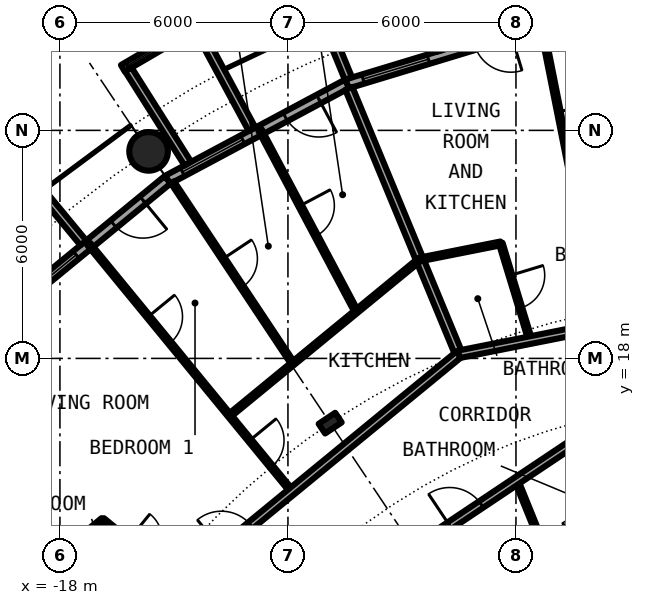
"""IFC4 building model, lengths in metres.
Left out: names, types, materials, properties, quantities, classifications, styles, units other than length and angle.
Written with IfcOpenShell. Run it as: python <this file> out.ifc"""

import sys

from ifc_helpers import new_model, si_unit, direction, frame, frame_2d, origin, origin_2d, place, context, subcontext, project, spatial, rectangle, circle, hollow_circle, i_section, extrude, element, fill, save


model = new_model("IFC4")
c1 = context("Model", 3, precision=1e-05, world=origin(), true_north=direction((0.0, 1.0)))
c2 = subcontext(c1, "Body", "Model", "MODEL_VIEW")
j1 = project(units=[si_unit("LENGTHUNIT", "METRE"), si_unit("PLANEANGLEUNIT", "RADIAN")], contexts=[c1])
p1 = place(None, origin())
s1 = spatial("IfcSite", under=j1, at=p1, CompositionType="ELEMENT")
p2 = place(p1, origin())
s2 = spatial("IfcBuilding", under=s1, at=p2, CompositionType="ELEMENT")
p3 = place(p2, frame((0.0, 0.0, 88.0)))
s3 = spatial("IfcBuildingStorey", under=s2, at=p3, CompositionType="ELEMENT", Elevation=88.0)
p4 = place(p3, frame((-15.667, 23.448, 0.0), z_axis=(0.0, 0.0, 1.0), x_axis=(1.0, 0.0, 0.0)))
e1 = element("IfcColumn", 1, at=p4, inside=s3, PredefinedType="COLUMN", context=c2, shape_type="SweptSolid", body=[
    extrude(hollow_circle(Radius=0.508, WallThickness=0.04, at=origin_2d()), origin(), (0.0, 0.0, 1.0), 3.05),
])
p5 = place(p3, frame((-10.889, 16.297, 0.0), z_axis=(0.0, 0.0, 1.0), x_axis=(-0.55557023302, 0.831469612303, 0.0)))
e2 = element("IfcColumn", 2, at=p5, inside=s3, PredefinedType="COLUMN", context=c2, shape_type="SweptSolid", body=[
    extrude(i_section(OverallWidth=0.306, OverallDepth=0.524, WebThickness=0.021, FlangeThickness=0.04, FilletRadius=0.027, at=origin_2d()), origin(), (0.0, 0.0, 1.0), 3.05),
])
p6 = place(p3, frame((-5.326, 26.775, 0.0), z_axis=(0.0, 0.0, 1.0), x_axis=(-0.956965678721, -0.290201119486, 0.0)))
e3 = element("IfcWall", 3, at=p6, inside=s3, PredefinedType="SOLIDWALL", context=c2, shape_type="SweptSolid", body=[
    extrude(rectangle(XDim=5.351, YDim=0.25, at=frame_2d((2.676, 0.0))), origin(), (0.0, 0.0, 1.0), 2.7),
])
p7 = place(p6, frame((0.841, 0.0, 0.0)))
e4 = element("IfcOpeningElement", 4, at=p7, cuts=e3, PredefinedType="OPENING", context=c2, shape_type="SweptSolid", body=[
    extrude(rectangle(XDim=1.0, YDim=2.2, at=frame_2d((0.5, 1.1))), frame((0.0, 0.135, 0.0), z_axis=(0.0, -1.0, 0.0), x_axis=(1.0, 0.0, 0.0)), (0.0, 0.0, 1.0), 0.27),
])
p8 = place(p6, frame((3.111, 0.0, 0.3)))
e5 = element("IfcOpeningElement", 5, at=p8, cuts=e3, PredefinedType="OPENING", context=c2, shape_type="SweptSolid", body=[
    extrude(rectangle(XDim=1.8, YDim=2.1, at=frame_2d((0.9, 1.05))), frame((0.0, 0.135, 0.0), z_axis=(0.0, -1.0, 0.0), x_axis=(1.0, 0.0, 0.0)), (0.0, 0.0, 1.0), 0.27),
])
p9 = place(p3, frame((-8.009, 26.092, -0.03), z_axis=(0.0, 0.0, 1.0), x_axis=(-0.293406695073, 0.955987715029, 0.0)))
e6 = element("IfcWall", 6, at=p9, inside=s3, PredefinedType="SOLIDWALL", context=c2, shape_type="SweptSolid", body=[
    extrude(rectangle(XDim=3.006, YDim=0.2, at=frame_2d((1.503, 0.0))), origin(), (0.0, 0.0, 1.0), 2.73),
])
p10 = place(p3, frame((-10.409, 25.364, -0.03), z_axis=(0.0, 0.0, 1.0), x_axis=(-0.379509886562, 0.925187681501, 0.0)))
e7 = element("IfcWall", 7, at=p10, inside=s3, PredefinedType="SOLIDWALL", context=c2, shape_type="SweptSolid", body=[
    extrude(rectangle(XDim=2.883, YDim=0.2, at=frame_2d((1.441, 0.0))), origin(), (0.0, 0.0, 1.0), 2.73),
])
p11 = place(p3, frame((-10.447, 25.222, 0.0), z_axis=(0.0, 0.0, 1.0), x_axis=(-0.881915646801, -0.471407246368, 0.0)))
e8 = element("IfcWall", 8, at=p11, inside=s3, PredefinedType="SOLIDWALL", context=c2, shape_type="SweptSolid", body=[
    extrude(rectangle(XDim=5.352, YDim=0.25, at=frame_2d((2.676, 0.0))), origin(), (0.0, 0.0, 1.0), 2.7),
])
p12 = place(p11, frame((0.841, 0.0, 0.0)))
e9 = element("IfcOpeningElement", 9, at=p12, cuts=e8, PredefinedType="OPENING", context=c2, shape_type="SweptSolid", body=[
    extrude(rectangle(XDim=1.0, YDim=2.2, at=frame_2d((0.5, 1.1))), frame((0.0, 0.135, 0.0), z_axis=(0.0, -1.0, 0.0), x_axis=(1.0, 0.0, 0.0)), (0.0, 0.0, 1.0), 0.27),
])
p13 = place(p11, frame((3.111, 0.0, 0.3)))
e10 = element("IfcOpeningElement", 10, at=p13, cuts=e8, PredefinedType="OPENING", context=c2, shape_type="SweptSolid", body=[
    extrude(rectangle(XDim=1.8, YDim=2.1, at=frame_2d((0.9, 1.05))), frame((0.0, 0.135, 0.0), z_axis=(0.0, -1.0, 0.0), x_axis=(1.0, 0.0, 0.0)), (0.0, 0.0, 1.0), 0.27),
])
p14 = place(p3, frame((-14.327, 26.812, -0.03), z_axis=(0.0, 0.0, 1.0), x_axis=(-0.863346521872, -0.504611517081, 0.0)))
e11 = element("IfcWall", 11, at=p14, inside=s3, PredefinedType="SOLIDWALL", context=c2, shape_type="SweptSolid", body=[
    extrude(rectangle(XDim=2.336, YDim=0.2, at=frame_2d((1.168, 0.0))), origin(), (0.0, 0.0, 1.0), 2.73),
])
p15 = place(p14, frame((0.128, 0.0, 0.33)))
e12 = element("IfcOpeningElement", 12, at=p15, cuts=e11, PredefinedType="OPENING", context=c2, shape_type="SweptSolid", body=[
    extrude(circle(Radius=1.04, at=frame_2d((1.04, 1.04))), frame((0.0, 0.11, 0.0), z_axis=(0.0, -1.0, 0.0), x_axis=(1.0, 0.0, 0.0)), (0.0, 0.0, 1.0), 0.22),
])
p16 = place(p3, frame((-12.945, 24.029, -0.03), z_axis=(0.0, 0.0, 1.0), x_axis=(-0.474424310775, 0.88029629861, 0.0)))
e13 = element("IfcWall", 13, at=p16, inside=s3, PredefinedType="SOLIDWALL", context=c2, shape_type="SweptSolid", body=[
    extrude(rectangle(XDim=3.006, YDim=0.2, at=frame_2d((1.503, 0.0))), origin(), (0.0, 0.0, 1.0), 2.73),
])
p17 = place(p3, frame((-14.635, 23.126, -0.03), z_axis=(0.0, 0.0, 1.0), x_axis=(-0.534437802731, 0.845207805816, 0.0)))
e14 = element("IfcWall", 14, at=p17, inside=s3, PredefinedType="SOLIDWALL", context=c2, shape_type="SweptSolid", body=[
    extrude(rectangle(XDim=2.932, YDim=0.2, at=frame_2d((1.466, 0.0))), origin(), (0.0, 0.0, 1.0), 2.73),
])
p18 = place(p3, frame((-15.167, 22.699, 0.0), z_axis=(0.0, 0.0, 1.0), x_axis=(-0.773019449054, -0.634382322723, 0.0)))
e15 = element("IfcWall", 15, at=p18, inside=s3, PredefinedType="SOLIDWALL", context=c2, shape_type="SweptSolid", body=[
    extrude(rectangle(XDim=5.352, YDim=0.25, at=frame_2d((2.676, 0.0))), origin(), (0.0, 0.0, 1.0), 2.7),
])
p19 = place(p18, frame((0.841, 0.0, 0.0)))
e16 = element("IfcOpeningElement", 16, at=p19, cuts=e15, PredefinedType="OPENING", context=c2, shape_type="SweptSolid", body=[
    extrude(rectangle(XDim=1.0, YDim=2.2, at=frame_2d((0.5, 1.1))), frame((0.0, 0.135, 0.0), z_axis=(0.0, -1.0, 0.0), x_axis=(1.0, 0.0, 0.0)), (0.0, 0.0, 1.0), 0.27),
])
p20 = place(p18, frame((3.111, 0.0, 0.3)))
e17 = element("IfcOpeningElement", 17, at=p20, cuts=e15, PredefinedType="OPENING", context=c2, shape_type="SweptSolid", body=[
    extrude(rectangle(XDim=1.8, YDim=2.1, at=frame_2d((0.9, 1.05))), frame((0.0, 0.135, 0.0), z_axis=(0.0, -1.0, 0.0), x_axis=(1.0, 0.0, 0.0)), (0.0, 0.0, 1.0), 0.27),
])
p21 = place(p3, frame((-17.384, 21.041, -0.03), z_axis=(0.0, 0.0, 1.0), x_axis=(-0.63709551667, 0.770784861449, 0.0)))
e18 = element("IfcWall", 18, at=p21, inside=s3, PredefinedType="SOLIDWALL", context=c2, shape_type="SweptSolid", body=[
    extrude(rectangle(XDim=3.006, YDim=0.2, at=frame_2d((1.503, 0.0))), origin(), (0.0, 0.0, 1.0), 2.73),
])
p22 = place(p3, frame((-22.595, 15.098, 0.0), z_axis=(0.0, 0.0, 1.0), x_axis=(0.831382022135, -0.555701298605, 0.0)))
e19 = element("IfcWall", 19, at=p22, inside=s3, PredefinedType="PARTITIONING", context=c2, shape_type="SweptSolid", body=[
    extrude(rectangle(XDim=7.313, YDim=0.2, at=frame_2d((3.657, 0.0))), origin(), (0.0, 0.0, 1.0), 2.7),
])
p23 = place(p3, frame((-17.24, 21.007, 0.0), z_axis=(0.0, 0.0, 1.0), x_axis=(0.634396151441, -0.77300810024, 0.0)))
e20 = element("IfcWall", 20, at=p23, inside=s3, PredefinedType="PARTITIONING", context=c2, shape_type="SweptSolid", body=[
    extrude(rectangle(XDim=8.419, YDim=0.1, at=frame_2d((4.209, 0.0))), origin(), (0.0, 0.0, 1.0), 2.7),
])
p24 = place(p23, frame((6.679, 0.0, 0.0)))
e21 = element("IfcOpeningElement", 21, at=p24, cuts=e20, PredefinedType="OPENING", context=c2, shape_type="SweptSolid", body=[
    extrude(rectangle(XDim=0.9, YDim=2.3, at=frame_2d((0.45, 1.15))), frame((0.0, 0.06, 0.0), z_axis=(0.0, -1.0, 0.0), x_axis=(1.0, 0.0, 0.0)), (0.0, 0.0, 1.0), 0.12),
])
p25 = place(p23, frame((2.468, 0.0, 0.0)))
e22 = element("IfcOpeningElement", 22, at=p25, cuts=e20, PredefinedType="OPENING", context=c2, shape_type="SweptSolid", body=[
    extrude(rectangle(XDim=0.9, YDim=2.3, at=frame_2d((0.45, 1.15))), frame((0.0, 0.06, 0.0), z_axis=(0.0, -1.0, 0.0), x_axis=(1.0, 0.0, 0.0)), (0.0, 0.0, 1.0), 0.12),
])
p26 = place(p3, frame((-16.874, 13.758, 0.0), z_axis=(0.0, 0.0, 1.0), x_axis=(0.774979608522, -0.631986239072, 0.0)))
e23 = element("IfcWall", 23, at=p26, inside=s3, PredefinedType="PARTITIONING", context=c2, shape_type="SweptSolid", body=[
    extrude(rectangle(XDim=2.636, YDim=0.1, at=frame_2d((1.318, 0.0))), origin(), (0.0, 0.0, 1.0), 2.7),
])
p27 = place(p26, frame((0.868, 0.0, 0.0)))
e24 = element("IfcOpeningElement", 24, at=p27, cuts=e23, PredefinedType="OPENING", context=c2, shape_type="SweptSolid", body=[
    extrude(rectangle(XDim=0.9, YDim=2.3, at=frame_2d((0.45, 1.15))), frame((0.0, 0.06, 0.0), z_axis=(0.0, -1.0, 0.0), x_axis=(1.0, 0.0, 0.0)), (0.0, 0.0, 1.0), 0.12),
])
p28 = place(p3, frame((-15.039, 22.634, 0.0), z_axis=(0.0, 0.0, 1.0), x_axis=(0.553440102418, -0.832888980018, 0.0)))
e25 = element("IfcWall", 25, at=p28, inside=s3, PredefinedType="PARTITIONING", context=c2, shape_type="SweptSolid", body=[
    extrude(rectangle(XDim=5.726, YDim=0.1, at=frame_2d((2.863, 0.0))), origin(), (0.0, 0.0, 1.0), 2.7),
])
p29 = place(p28, frame((2.413, 0.0, 0.0)))
e26 = element("IfcOpeningElement", 26, at=p29, cuts=e25, PredefinedType="OPENING", context=c2, shape_type="SweptSolid", body=[
    extrude(rectangle(XDim=0.9, YDim=2.3, at=frame_2d((0.45, 1.15))), frame((0.0, 0.06, 0.0), z_axis=(0.0, -1.0, 0.0), x_axis=(1.0, 0.0, 0.0)), (0.0, 0.0, 1.0), 0.12),
])
p30 = place(p3, frame((-12.734, 24.007, 0.0), z_axis=(0.0, 0.0, 1.0), x_axis=(0.468610030042, -0.883405139075, 0.0)))
e27 = element("IfcWall", 27, at=p30, inside=s3, PredefinedType="PARTITIONING", context=c2, shape_type="SweptSolid", body=[
    extrude(rectangle(XDim=5.403, YDim=0.1, at=frame_2d((2.702, 0.0))), origin(), (0.0, 0.0, 1.0), 2.7),
])
p31 = place(p30, frame((2.252, 0.0, 0.0)))
e28 = element("IfcOpeningElement", 28, at=p31, cuts=e27, PredefinedType="OPENING", context=c2, shape_type="SweptSolid", body=[
    extrude(rectangle(XDim=0.9, YDim=2.3, at=frame_2d((0.45, 1.15))), frame((0.0, 0.06, 0.0), z_axis=(0.0, -1.0, 0.0), x_axis=(1.0, 0.0, 0.0)), (0.0, 0.0, 1.0), 0.12),
])
p32 = place(p3, frame((-10.398, 25.106, 0.0), z_axis=(0.0, 0.0, 1.0), x_axis=(0.382490346157, -0.923959487801, 0.0)))
e29 = element("IfcWall", 29, at=p32, inside=s3, PredefinedType="PARTITIONING", context=c2, shape_type="SweptSolid", body=[
    extrude(rectangle(XDim=7.574, YDim=0.2, at=frame_2d((3.787, 0.0))), origin(), (0.0, 0.0, 1.0), 2.7),
])
p33 = place(p3, frame((-6.4, 21.027, 0.0), z_axis=(0.0, 0.0, 1.0), x_axis=(0.291157965538, -0.956674991365, 0.0)))
e30 = element("IfcWall", 30, at=p33, inside=s3, PredefinedType="PARTITIONING", context=c2, shape_type="SweptSolid", body=[
    extrude(rectangle(XDim=2.661, YDim=0.1, at=frame_2d((1.331, 0.0))), origin(), (0.0, 0.0, 1.0), 2.7),
])
p34 = place(p33, frame((0.881, 0.0, 0.0)))
e31 = element("IfcOpeningElement", 31, at=p34, cuts=e30, PredefinedType="OPENING", context=c2, shape_type="SweptSolid", body=[
    extrude(rectangle(XDim=0.9, YDim=2.3, at=frame_2d((0.45, 1.15))), frame((0.0, 0.06, 0.0), z_axis=(0.0, -1.0, 0.0), x_axis=(1.0, 0.0, 0.0)), (0.0, 0.0, 1.0), 0.12),
])
p35 = place(p3, frame((-5.986, 14.779, 0.0), z_axis=(0.0, 0.0, 1.0), x_axis=(0.375649498413, -0.926761811008, 0.0)))
e32 = element("IfcWall", 32, at=p35, inside=s3, PredefinedType="PARTITIONING", context=c2, shape_type="SweptSolid", body=[
    extrude(rectangle(XDim=2.548, YDim=0.1, at=frame_2d((1.274, 0.0))), origin(), (0.0, 0.0, 1.0), 2.7),
])
p36 = place(p3, frame((-5.302, 26.653, 0.0), z_axis=(0.0, 0.0, 1.0), x_axis=(0.195115793364, -0.980780213493, 0.0)))
e33 = element("IfcWall", 33, at=p36, inside=s3, PredefinedType="PARTITIONING", context=c2, shape_type="SweptSolid", body=[
    extrude(rectangle(XDim=5.304, YDim=0.1, at=frame_2d((2.652, 0.0))), origin(), (0.0, 0.0, 1.0), 2.7),
])
p37 = place(p36, frame((2.202, 0.0, 0.0)))
e34 = element("IfcOpeningElement", 34, at=p37, cuts=e33, PredefinedType="OPENING", context=c2, shape_type="SweptSolid", body=[
    extrude(rectangle(XDim=0.9, YDim=2.3, at=frame_2d((0.45, 1.15))), frame((0.0, 0.06, 0.0), z_axis=(0.0, -1.0, 0.0), x_axis=(1.0, 0.0, 0.0)), (0.0, 0.0, 1.0), 0.12),
])
p38 = place(p3, frame((-5.032, 12.417, 0.0), z_axis=(0.0, 0.0, 1.0), x_axis=(0.831538390496, 0.555467285384, 0.0)))
e35 = element("IfcWall", 35, at=p38, inside=s3, PredefinedType="PARTITIONING", context=c2, shape_type="SweptSolid", body=[
    extrude(rectangle(XDim=2.717, YDim=0.1, at=frame_2d((1.358, 0.0))), origin(), (0.0, 0.0, 1.0), 2.7),
])
p39 = place(p38, frame((0.911, 0.0, 0.0)))
e36 = element("IfcOpeningElement", 36, at=p39, cuts=e35, PredefinedType="OPENING", context=c2, shape_type="SweptSolid", body=[
    extrude(rectangle(XDim=0.9, YDim=2.3, at=frame_2d((0.45, 1.15))), frame((0.0, 0.06, 0.0), z_axis=(0.0, -1.0, 0.0), x_axis=(1.0, 0.0, 0.0)), (0.0, 0.0, 1.0), 0.12),
])
p40 = place(p3, frame((-12.708, 10.286, 0.0), z_axis=(0.0, 0.0, 1.0), x_axis=(0.831405725802, 0.555665834026, 0.0)))
e37 = element("IfcWall", 37, at=p40, inside=s3, PredefinedType="PARTITIONING", context=c2, shape_type="SweptSolid", body=[
    extrude(rectangle(XDim=11.314, YDim=0.2, at=frame_2d((5.657, 0.0))), origin(), (0.0, 0.0, 1.0), 2.7),
])
p41 = place(p40, frame((5.969, 0.0, 0.0)))
e38 = element("IfcOpeningElement", 38, at=p41, cuts=e37, PredefinedType="OPENING", context=c2, shape_type="SweptSolid", body=[
    extrude(rectangle(XDim=1.0, YDim=2.3, at=frame_2d((0.5, 1.15))), frame((0.0, 0.11, 0.0), z_axis=(0.0, -1.0, 0.0), x_axis=(1.0, 0.0, 0.0)), (0.0, 0.0, 1.0), 0.22),
])
p42 = place(p3, frame((-16.173, 10.991, 0.0), z_axis=(0.0, 0.0, 1.0), x_axis=(0.773049018445, 0.634346289562, 0.0)))
e39 = element("IfcWall", 39, at=p42, inside=s3, PredefinedType="PARTITIONING", context=c2, shape_type="SweptSolid", body=[
    extrude(rectangle(XDim=11.219, YDim=0.2, at=frame_2d((5.61, 0.0))), origin(), (0.0, 0.0, 1.0), 2.38),
])
p43 = place(p42, frame((3.135, 0.0, 0.0)))
e40 = element("IfcOpeningElement", 40, at=p43, cuts=e39, PredefinedType="OPENING", context=c2, shape_type="SweptSolid", body=[
    extrude(rectangle(XDim=1.0, YDim=2.3, at=frame_2d((0.5, 1.15))), frame((0.0, 0.11, 0.0), z_axis=(0.0, -1.0, 0.0), x_axis=(1.0, 0.0, 0.0)), (0.0, 0.0, 1.0), 0.22),
])
p44 = place(p3, frame((-7.501, 18.108, 0.0), z_axis=(0.0, 0.0, 1.0), x_axis=(0.980791233058, 0.195060393611, 0.0)))
e41 = element("IfcWall", 41, at=p44, inside=s3, PredefinedType="PARTITIONING", context=c2, shape_type="SweptSolid", body=[
    extrude(rectangle(XDim=7.65, YDim=0.2, at=frame_2d((3.825, 0.0))), origin(), (0.0, 0.0, 1.0), 2.38),
])
p45 = place(p44, frame((4.313, 0.0, 0.0)))
e42 = element("IfcOpeningElement", 42, at=p45, cuts=e41, PredefinedType="OPENING", context=c2, shape_type="SweptSolid", body=[
    extrude(rectangle(XDim=1.0, YDim=2.3, at=frame_2d((0.5, 1.15))), frame((0.0, 0.11, 0.0), z_axis=(0.0, -1.0, 0.0), x_axis=(1.0, 0.0, 0.0)), (0.0, 0.0, 1.0), 0.22),
])
p46 = place(p3, frame((-18.542, 12.389, 0.0), z_axis=(0.0, 0.0, 1.0), x_axis=(0.772948171844, 0.634469166818, 0.0)))
e43 = element("IfcWall", 43, at=p46, inside=s3, PredefinedType="PARTITIONING", context=c2, shape_type="SweptSolid", body=[
    extrude(rectangle(XDim=2.158, YDim=0.1, at=frame_2d((1.079, 0.0))), origin(), (0.0, 0.0, 1.0), 2.7),
])
p47 = place(p3, frame((-13.538, 16.496, 0.0), z_axis=(0.0, 0.0, 1.0), x_axis=(0.773000340237, 0.634405606843, 0.0)))
e44 = element("IfcWall", 44, at=p47, inside=s3, PredefinedType="PARTITIONING", context=c2, shape_type="SweptSolid", body=[
    extrude(rectangle(XDim=6.474, YDim=0.1, at=frame_2d((3.237, 0.0))), origin(), (0.0, 0.0, 1.0), 2.7),
])
p48 = place(p3, frame((-8.534, 20.603, 0.0), z_axis=(0.0, 0.0, 1.0), x_axis=(0.980821612706, 0.194907578226, 0.0)))
e45 = element("IfcWall", 45, at=p48, inside=s3, PredefinedType="PARTITIONING", context=c2, shape_type="SweptSolid", body=[
    extrude(rectangle(XDim=2.176, YDim=0.1, at=frame_2d((1.088, 0.0))), origin(), (0.0, 0.0, 1.0), 2.7),
])
p49 = place(p8, origin())
e46 = element("IfcWindow", 46, at=p49, inside=s3, PartitioningType="SINGLE_PANEL", PredefinedType="WINDOW", context=c2, shape_type="SweptSolid", body=[
    extrude(rectangle(XDim=1.8, YDim=2.1, at=frame_2d((0.9, 1.05))), frame((0.0, 0.03, 0.0), z_axis=(0.0, -1.0, 0.0), x_axis=(1.0, 0.0, 0.0)), (0.0, 0.0, 1.0), 0.06),
])
fill(e5, e46)
p50 = place(p12, origin())
e47 = element("IfcDoor", 47, at=p50, inside=s3, OperationType="SINGLE_SWING_LEFT", PredefinedType="DOOR", context=c2, shape_type="SweptSolid", body=[
    extrude(rectangle(XDim=1.0, YDim=2.2, at=frame_2d((0.5, 1.1))), frame((0.0, 0.025, 0.0), z_axis=(0.0, -1.0, 0.0), x_axis=(1.0, 0.0, 0.0)), (0.0, 0.0, 1.0), 0.05),
])
fill(e9, e47)
p51 = place(p13, origin())
e48 = element("IfcWindow", 48, at=p51, inside=s3, PartitioningType="SINGLE_PANEL", PredefinedType="WINDOW", context=c2, shape_type="SweptSolid", body=[
    extrude(rectangle(XDim=1.8, YDim=2.1, at=frame_2d((0.9, 1.05))), frame((0.0, 0.03, 0.0), z_axis=(0.0, -1.0, 0.0), x_axis=(1.0, 0.0, 0.0)), (0.0, 0.0, 1.0), 0.06),
])
fill(e10, e48)
p52 = place(p15, origin())
e49 = element("IfcWindow", 49, at=p52, inside=s3, PartitioningType="SINGLE_PANEL", PredefinedType="WINDOW", context=c2, shape_type="SweptSolid", body=[
    extrude(circle(Radius=1.04, at=frame_2d((1.04, 1.04))), frame((0.0, 0.03, 0.0), z_axis=(0.0, -1.0, 0.0), x_axis=(1.0, 0.0, 0.0)), (0.0, 0.0, 1.0), 0.06),
])
fill(e12, e49)
p53 = place(p19, origin())
e50 = element("IfcDoor", 50, at=p53, inside=s3, OperationType="SINGLE_SWING_LEFT", PredefinedType="DOOR", context=c2, shape_type="SweptSolid", body=[
    extrude(rectangle(XDim=1.0, YDim=2.2, at=frame_2d((0.5, 1.1))), frame((0.0, 0.025, 0.0), z_axis=(0.0, -1.0, 0.0), x_axis=(1.0, 0.0, 0.0)), (0.0, 0.0, 1.0), 0.05),
])
fill(e16, e50)
p54 = place(p20, origin())
e51 = element("IfcWindow", 51, at=p54, inside=s3, PartitioningType="SINGLE_PANEL", PredefinedType="WINDOW", context=c2, shape_type="SweptSolid", body=[
    extrude(rectangle(XDim=1.8, YDim=2.1, at=frame_2d((0.9, 1.05))), frame((0.0, 0.03, 0.0), z_axis=(0.0, -1.0, 0.0), x_axis=(1.0, 0.0, 0.0)), (0.0, 0.0, 1.0), 0.06),
])
fill(e17, e51)
p55 = place(p34, origin())
e52 = element("IfcDoor", 52, at=p55, inside=s3, OperationType="SINGLE_SWING_RIGHT", PredefinedType="DOOR", context=c2, shape_type="SweptSolid", body=[
    extrude(rectangle(XDim=0.9, YDim=2.3, at=frame_2d((0.45, 1.15))), frame((0.0, 0.025, 0.0), z_axis=(0.0, -1.0, 0.0), x_axis=(1.0, 0.0, 0.0)), (0.0, 0.0, 1.0), 0.05),
])
fill(e31, e52)
p56 = place(p37, origin())
e53 = element("IfcDoor", 53, at=p56, inside=s3, OperationType="SINGLE_SWING_LEFT", PredefinedType="DOOR", context=c2, shape_type="SweptSolid", body=[
    extrude(rectangle(XDim=0.9, YDim=2.3, at=frame_2d((0.45, 1.15))), frame((0.0, 0.025, 0.0), z_axis=(0.0, -1.0, 0.0), x_axis=(1.0, 0.0, 0.0)), (0.0, 0.0, 1.0), 0.05),
])
fill(e34, e53)
p57 = place(p43, origin())
e54 = element("IfcDoor", 54, at=p57, inside=s3, OperationType="SINGLE_SWING_LEFT", PredefinedType="DOOR", context=c2, shape_type="SweptSolid", body=[
    extrude(rectangle(XDim=1.0, YDim=2.3, at=frame_2d((0.5, 1.15))), frame((0.0, 0.025, 0.0), z_axis=(0.0, -1.0, 0.0), x_axis=(1.0, 0.0, 0.0)), (0.0, 0.0, 1.0), 0.05),
])
fill(e40, e54)
p58 = place(p24, origin())
e55 = element("IfcDoor", 55, at=p58, inside=s3, OperationType="SINGLE_SWING_RIGHT", PredefinedType="DOOR", context=c2, shape_type="SweptSolid", body=[
    extrude(rectangle(XDim=0.9, YDim=2.3, at=frame_2d((0.45, 1.15))), frame((0.0, 0.025, 0.0), z_axis=(0.0, -1.0, 0.0), x_axis=(1.0, 0.0, 0.0)), (0.0, 0.0, 1.0), 0.05),
])
fill(e21, e55)
p59 = place(p25, origin())
e56 = element("IfcDoor", 56, at=p59, inside=s3, OperationType="SINGLE_SWING_LEFT", PredefinedType="DOOR", context=c2, shape_type="SweptSolid", body=[
    extrude(rectangle(XDim=0.9, YDim=2.3, at=frame_2d((0.45, 1.15))), frame((0.0, 0.025, 0.0), z_axis=(0.0, -1.0, 0.0), x_axis=(1.0, 0.0, 0.0)), (0.0, 0.0, 1.0), 0.05),
])
fill(e22, e56)
p60 = place(p29, origin())
e57 = element("IfcDoor", 57, at=p60, inside=s3, OperationType="SINGLE_SWING_RIGHT", PredefinedType="DOOR", context=c2, shape_type="SweptSolid", body=[
    extrude(rectangle(XDim=0.9, YDim=2.3, at=frame_2d((0.45, 1.15))), frame((0.0, 0.025, 0.0), z_axis=(0.0, -1.0, 0.0), x_axis=(1.0, 0.0, 0.0)), (0.0, 0.0, 1.0), 0.05),
])
fill(e26, e57)
p61 = place(p31, origin())
e58 = element("IfcDoor", 58, at=p61, inside=s3, OperationType="SINGLE_SWING_LEFT", PredefinedType="DOOR", context=c2, shape_type="SweptSolid", body=[
    extrude(rectangle(XDim=0.9, YDim=2.3, at=frame_2d((0.45, 1.15))), frame((0.0, 0.025, 0.0), z_axis=(0.0, -1.0, 0.0), x_axis=(1.0, 0.0, 0.0)), (0.0, 0.0, 1.0), 0.05),
])
fill(e28, e58)
p62 = place(p41, origin())
e59 = element("IfcDoor", 59, at=p62, inside=s3, OperationType="SINGLE_SWING_RIGHT", PredefinedType="DOOR", context=c2, shape_type="SweptSolid", body=[
    extrude(rectangle(XDim=1.0, YDim=2.3, at=frame_2d((0.5, 1.15))), frame((0.0, 0.025, 0.0), z_axis=(0.0, -1.0, 0.0), x_axis=(1.0, 0.0, 0.0)), (0.0, 0.0, 1.0), 0.05),
])
fill(e38, e59)
save(model, sys.argv[1])
